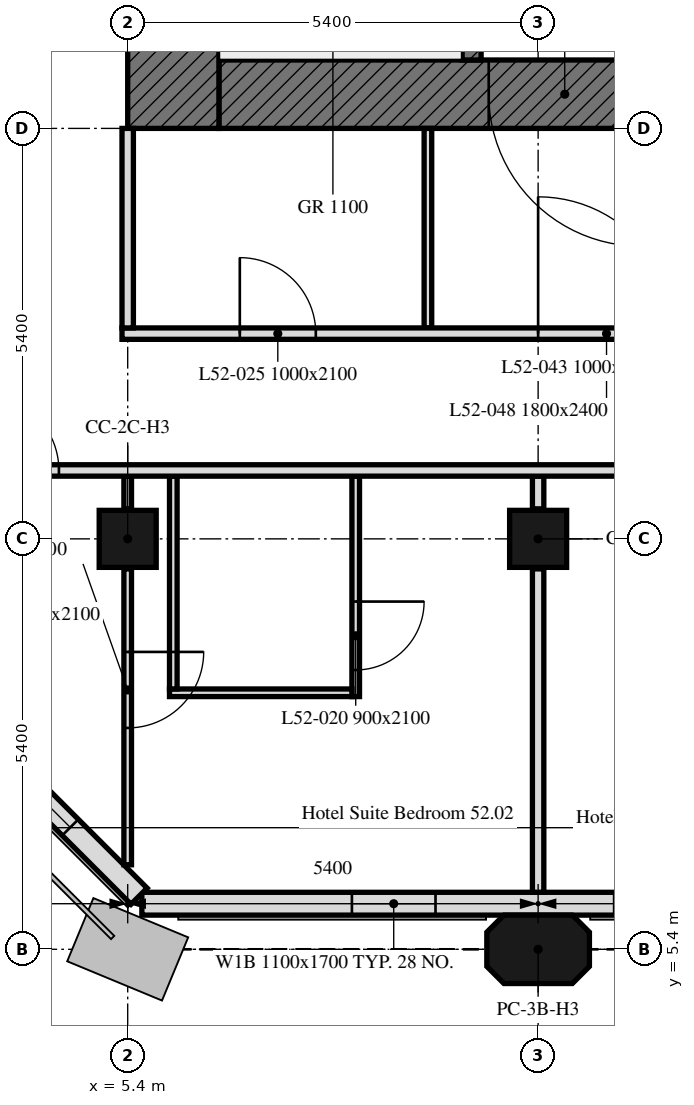
"""IFC4 building model, lengths in metres.
Left out: names, types, materials, properties, quantities, classifications, styles, units other than length and angle.
Written with IfcOpenShell. Run it as: python <this file> out.ifc"""

import sys

from ifc_helpers import new_model, si_unit, direction, frame, frame_2d, origin, origin_2d, place, context, subcontext, project, spatial, polyline, rectangle, outline, extrude, element, fill, save


model = new_model("IFC4")
c1 = context("Model", 3, precision=1e-05, world=origin(), true_north=direction((0.0, 1.0)))
c2 = subcontext(c1, "Body", "Model", "MODEL_VIEW")
j1 = project(units=[si_unit("LENGTHUNIT", "METRE"), si_unit("PLANEANGLEUNIT", "RADIAN")], contexts=[c1])
p1 = place(None, origin())
s1 = spatial("IfcSite", under=j1, at=p1, CompositionType="ELEMENT")
p2 = place(p1, origin())
s2 = spatial("IfcBuilding", under=s1, at=p2, CompositionType="ELEMENT")
p3 = place(p2, frame((0.0, 0.0, 210.4)))
s3 = spatial("IfcBuildingStorey", under=s2, at=p3, CompositionType="ELEMENT", Elevation=210.4)
p4 = place(p3, frame((10.8, 5.4, 0.0), z_axis=(0.0, 0.0, 1.0), x_axis=(1.0, 0.0, 0.0)))
e1 = element("IfcColumn", 1, at=p4, inside=s3, PredefinedType="COLUMN", context=c2, shape_type="SweptSolid", body=[
    extrude(outline(polyline([(-0.45, -0.45), (0.45, -0.45), (0.675, -0.225), (0.675, 0.225), (0.45, 0.45), (-0.45, 0.45), (-0.675, 0.225), (-0.675, -0.225), (-0.45, -0.45)])), origin(), (0.0, 0.0, 1.0), 3.0),
])
for number, where, z_axis, x_axis in (
    (2, (5.4, 10.8, 0.0), (0.0, 0.0, 1.0), (1.0, 0.0, 0.0)),
    (3, (10.8, 10.8, 0.0), (0.0, 0.0, 1.0), (1.0, 0.0, 0.0)),
):
    element("IfcColumn", number, at=place(p3, frame(where, z_axis=z_axis, x_axis=x_axis)), inside=s3, PredefinedType="COLUMN", context=c2, shape_type="SweptSolid", body=[
        extrude(rectangle(XDim=0.75, YDim=0.75, at=origin_2d()), origin(), (0.0, 0.0, 1.0), 3.0),
    ])
p5 = place(p3, frame((5.586, 6.0, 0.0), z_axis=(0.0, 0.0, 1.0), x_axis=(1.0, 0.0, 0.0)))
e4 = element("IfcWall", 4, at=p5, inside=s3, PredefinedType="SOLIDWALL", context=c2, shape_type="SweptSolid", body=[
    extrude(rectangle(XDim=32.027, YDim=0.3, at=frame_2d((16.014, 0.0))), origin(), (0.0, 0.0, 1.0), 3.0),
])
p6 = place(p5, frame((2.764, 0.0, 0.9)))
e5 = element("IfcOpeningElement", 5, at=p6, cuts=e4, PredefinedType="OPENING", context=c2, shape_type="SweptSolid", body=[
    extrude(rectangle(XDim=1.1, YDim=1.7, at=frame_2d((0.55, 0.85))), frame((0.0, 0.16, 0.0), z_axis=(0.0, -1.0, 0.0), x_axis=(1.0, 0.0, 0.0)), (0.0, 0.0, 1.0), 0.32),
])
p7 = place(p5, frame((6.214, 0.0, 0.9)))
e6 = element("IfcOpeningElement", 6, at=p7, cuts=e4, PredefinedType="OPENING", context=c2, shape_type="SweptSolid", body=[
    extrude(rectangle(XDim=3.4, YDim=1.7, at=frame_2d((1.7, 0.85))), frame((0.0, 0.16, 0.0), z_axis=(0.0, -1.0, 0.0), x_axis=(1.0, 0.0, 0.0)), (0.0, 0.0, 1.0), 0.32),
])
p8 = place(p5, frame((13.564, 0.0, 0.9)))
e7 = element("IfcOpeningElement", 7, at=p8, cuts=e4, PredefinedType="OPENING", context=c2, shape_type="SweptSolid", body=[
    extrude(rectangle(XDim=1.1, YDim=1.7, at=frame_2d((0.55, 0.85))), frame((0.0, 0.16, 0.0), z_axis=(0.0, -1.0, 0.0), x_axis=(1.0, 0.0, 0.0)), (0.0, 0.0, 1.0), 0.32),
])
p9 = place(p5, frame((17.014, 0.0, 0.9)))
e8 = element("IfcOpeningElement", 8, at=p9, cuts=e4, PredefinedType="OPENING", context=c2, shape_type="SweptSolid", body=[
    extrude(rectangle(XDim=3.4, YDim=1.7, at=frame_2d((1.7, 0.85))), frame((0.0, 0.16, 0.0), z_axis=(0.0, -1.0, 0.0), x_axis=(1.0, 0.0, 0.0)), (0.0, 0.0, 1.0), 0.32),
])
p10 = place(p5, frame((24.364, 0.0, 0.9)))
e9 = element("IfcOpeningElement", 9, at=p10, cuts=e4, PredefinedType="OPENING", context=c2, shape_type="SweptSolid", body=[
    extrude(rectangle(XDim=1.1, YDim=1.7, at=frame_2d((0.55, 0.85))), frame((0.0, 0.16, 0.0), z_axis=(0.0, -1.0, 0.0), x_axis=(1.0, 0.0, 0.0)), (0.0, 0.0, 1.0), 0.32),
])
p11 = place(p5, frame((27.814, 0.0, 0.9)))
e10 = element("IfcOpeningElement", 10, at=p11, cuts=e4, PredefinedType="OPENING", context=c2, shape_type="SweptSolid", body=[
    extrude(rectangle(XDim=3.4, YDim=1.7, at=frame_2d((1.7, 0.85))), frame((0.0, 0.16, 0.0), z_axis=(0.0, -1.0, 0.0), x_axis=(1.0, 0.0, 0.0)), (0.0, 0.0, 1.0), 0.32),
])
p12 = place(p3, frame((0.699, 10.949, 0.0), z_axis=(0.0, 0.0, 1.0), x_axis=(0.707106781187, -0.707106781187, 0.0)))
e11 = element("IfcWall", 11, at=p12, inside=s3, PredefinedType="SOLIDWALL", context=c2, shape_type="SweptSolid", body=[
    extrude(rectangle(XDim=6.86, YDim=0.3, at=frame_2d((3.43, 0.0))), origin(), (0.0, 0.0, 1.0), 3.0),
])
p13 = place(p12, frame((1.28, 0.0, 0.9)))
e12 = element("IfcOpeningElement", 12, at=p13, cuts=e11, PredefinedType="OPENING", context=c2, shape_type="SweptSolid", body=[
    extrude(rectangle(XDim=1.1, YDim=1.7, at=frame_2d((0.55, 0.85))), frame((0.0, 0.16, 0.0), z_axis=(0.0, -1.0, 0.0), x_axis=(1.0, 0.0, 0.0)), (0.0, 0.0, 1.0), 0.32),
])
p14 = place(p12, frame((4.48, 0.0, 0.9)))
e13 = element("IfcOpeningElement", 13, at=p14, cuts=e11, PredefinedType="OPENING", context=c2, shape_type="SweptSolid", body=[
    extrude(rectangle(XDim=1.1, YDim=1.7, at=frame_2d((0.55, 0.85))), frame((0.0, 0.16, 0.0), z_axis=(0.0, -1.0, 0.0), x_axis=(1.0, 0.0, 0.0)), (0.0, 0.0, 1.0), 0.32),
])
p15 = place(p3, frame((17.7, 16.65, 0.0), z_axis=(0.0, 0.0, 1.0), x_axis=(-1.0, 0.0, 0.0)))
e14 = element("IfcWall", 14, at=p15, inside=s3, PredefinedType="SOLIDWALL", context=c2, shape_type="SweptSolid", body=[
    extrude(rectangle(XDim=11.1, YDim=0.9, at=frame_2d((5.55, 0.0))), origin(), (0.0, 0.0, 1.0), 3.0),
])
p16 = place(p15, frame((5.55, 0.0, 0.0)))
e15 = element("IfcOpeningElement", 15, at=p16, cuts=e14, PredefinedType="OPENING", context=c2, shape_type="SweptSolid", body=[
    extrude(rectangle(XDim=2.0, YDim=2.4, at=frame_2d((1.0, 1.2))), frame((0.0, 0.45, 0.0), z_axis=(0.0, -1.0, 0.0), x_axis=(1.0, 0.0, 0.0)), (0.0, 0.0, 1.0), 0.9),
])
p17 = place(p3, frame((6.0, 16.2, 0.0), z_axis=(0.0, 0.0, 1.0), x_axis=(0.0, 1.0, 0.0)))
e16 = element("IfcWall", 16, at=p17, inside=s3, PredefinedType="SOLIDWALL", context=c2, shape_type="SweptSolid", body=[
    extrude(rectangle(XDim=16.2, YDim=1.2, at=frame_2d((8.1, 0.0))), origin(), (0.0, 0.0, 1.0), 3.0),
])
p18 = place(p3, frame((9.925, 17.1, 0.0), z_axis=(0.0, 0.0, 1.0), x_axis=(0.0, 1.0, 0.0)))
e17 = element("IfcWall", 17, at=p18, inside=s3, PredefinedType="SOLIDWALL", context=c2, shape_type="SweptSolid", body=[
    extrude(rectangle(XDim=14.4, YDim=0.25, at=frame_2d((7.2, 0.0))), origin(), (0.0, 0.0, 1.0), 3.0),
])
p19 = place(p18, frame((4.6, 0.0, 0.0)))
e18 = element("IfcOpeningElement", 18, at=p19, cuts=e17, PredefinedType="OPENING", context=c2, shape_type="SweptSolid", body=[
    extrude(rectangle(XDim=1.0, YDim=2.1, at=frame_2d((0.5, 1.05))), frame((0.0, 0.125, 0.0), z_axis=(0.0, -1.0, 0.0), x_axis=(1.0, 0.0, 0.0)), (0.0, 0.0, 1.0), 0.25),
])
p20 = place(p18, frame((7.062, 0.0, 0.0)))
e19 = element("IfcOpeningElement", 19, at=p20, cuts=e17, PredefinedType="OPENING", context=c2, shape_type="SweptSolid", body=[
    extrude(rectangle(XDim=1.2, YDim=2.1, at=frame_2d((0.6, 1.05))), frame((0.0, 0.125, 0.0), z_axis=(0.0, -1.0, 0.0), x_axis=(1.0, 0.0, 0.0)), (0.0, 0.0, 1.0), 0.25),
])
p21 = place(p18, frame((9.979, 0.0, 0.0)))
e20 = element("IfcOpeningElement", 20, at=p21, cuts=e17, PredefinedType="OPENING", context=c2, shape_type="SweptSolid", body=[
    extrude(rectangle(XDim=0.9, YDim=2.1, at=frame_2d((0.45, 1.05))), frame((0.0, 0.125, 0.0), z_axis=(0.0, -1.0, 0.0), x_axis=(1.0, 0.0, 0.0)), (0.0, 0.0, 1.0), 0.25),
])
p22 = place(p18, frame((11.92, 0.0, 0.0)))
e21 = element("IfcOpeningElement", 21, at=p22, cuts=e17, PredefinedType="OPENING", context=c2, shape_type="SweptSolid", body=[
    extrude(rectangle(XDim=0.9, YDim=2.1, at=frame_2d((0.45, 1.05))), frame((0.0, 0.125, 0.0), z_axis=(0.0, -1.0, 0.0), x_axis=(1.0, 0.0, 0.0)), (0.0, 0.0, 1.0), 0.25),
])
p23 = place(p18, frame((13.354, 0.0, 0.0)))
e22 = element("IfcOpeningElement", 22, at=p23, cuts=e17, PredefinedType="OPENING", context=c2, shape_type="SweptSolid", body=[
    extrude(rectangle(XDim=0.9, YDim=2.1, at=frame_2d((0.45, 1.05))), frame((0.0, 0.125, 0.0), z_axis=(0.0, -1.0, 0.0), x_axis=(1.0, 0.0, 0.0)), (0.0, 0.0, 1.0), 0.25),
])
p24 = place(p3, frame((10.8, 11.625, 0.0), z_axis=(0.0, 0.0, 1.0), x_axis=(0.0, -1.0, 0.0)))
e23 = element("IfcWall", 23, at=p24, inside=s3, PredefinedType="PARTITIONING", context=c2, shape_type="SweptSolid", body=[
    extrude(rectangle(XDim=0.43, YDim=0.15, at=frame_2d((0.215, 0.0))), origin(), (0.0, 0.0, 1.0), 3.0),
])
p25 = place(p3, frame((10.8, 10.405, 0.0), z_axis=(0.0, 0.0, 1.0), x_axis=(0.0, -1.0, 0.0)))
e24 = element("IfcWall", 24, at=p25, inside=s3, PredefinedType="PARTITIONING", context=c2, shape_type="SweptSolid", body=[
    extrude(rectangle(XDim=4.254, YDim=0.15, at=frame_2d((2.127, 0.0))), origin(), (0.0, 0.0, 1.0), 3.0),
])
p26 = place(p3, frame((8.4, 11.625, 0.0), z_axis=(0.0, 0.0, 1.0), x_axis=(0.0, -1.0, 0.0)))
e25 = element("IfcWall", 25, at=p26, inside=s3, PredefinedType="PARTITIONING", context=c2, shape_type="SweptSolid", body=[
    extrude(rectangle(XDim=2.9, YDim=0.1, at=frame_2d((1.45, 0.0))), origin(), (0.0, 0.0, 1.0), 3.0),
])
p27 = place(p26, frame((1.65, 0.0, 0.0)))
e26 = element("IfcOpeningElement", 26, at=p27, cuts=e25, PredefinedType="OPENING", context=c2, shape_type="SweptSolid", body=[
    extrude(rectangle(XDim=0.9, YDim=2.1, at=frame_2d((0.45, 1.05))), frame((0.0, 0.05, 0.0), z_axis=(0.0, -1.0, 0.0), x_axis=(1.0, 0.0, 0.0)), (0.0, 0.0, 1.0), 0.1),
])
p28 = place(p3, frame((8.35, 8.775, 0.0), z_axis=(0.0, 0.0, 1.0), x_axis=(-1.0, 0.0, 0.0)))
e27 = element("IfcWall", 27, at=p28, inside=s3, PredefinedType="PARTITIONING", context=c2, shape_type="SweptSolid", body=[
    extrude(rectangle(XDim=2.4, YDim=0.1, at=frame_2d((1.2, 0.0))), origin(), (0.0, 0.0, 1.0), 3.0),
])
p29 = place(p3, frame((6.0, 8.825, 0.0), z_axis=(0.0, 0.0, 1.0), x_axis=(0.0, 1.0, 0.0)))
e28 = element("IfcWall", 28, at=p29, inside=s3, PredefinedType="PARTITIONING", context=c2, shape_type="SweptSolid", body=[
    extrude(rectangle(XDim=2.8, YDim=0.1, at=frame_2d((1.4, 0.0))), origin(), (0.0, 0.0, 1.0), 3.0),
])
p30 = place(p3, frame((5.4, 11.625, 0.0), z_axis=(0.0, 0.0, 1.0), x_axis=(0.0, -1.0, 0.0)))
e29 = element("IfcWall", 29, at=p30, inside=s3, PredefinedType="PARTITIONING", context=c2, shape_type="SweptSolid", body=[
    extrude(rectangle(XDim=0.43, YDim=0.1, at=frame_2d((0.215, 0.0))), origin(), (0.0, 0.0, 1.0), 3.0),
])
p31 = place(p3, frame((5.4, 10.405, 0.0), z_axis=(0.0, 0.0, 1.0), x_axis=(0.0, -1.0, 0.0)))
e30 = element("IfcWall", 30, at=p31, inside=s3, PredefinedType="PARTITIONING", context=c2, shape_type="SweptSolid", body=[
    extrude(rectangle(XDim=3.893, YDim=0.1, at=frame_2d((1.946, 0.0))), origin(), (0.0, 0.0, 1.0), 3.0),
])
p32 = place(p31, frame((1.093, 0.0, 0.0)))
e31 = element("IfcOpeningElement", 31, at=p32, cuts=e30, PredefinedType="OPENING", context=c2, shape_type="SweptSolid", body=[
    extrude(rectangle(XDim=1.0, YDim=2.1, at=frame_2d((0.5, 1.05))), frame((0.0, 0.05, 0.0), z_axis=(0.0, -1.0, 0.0), x_axis=(1.0, 0.0, 0.0)), (0.0, 0.0, 1.0), 0.1),
])
p33 = place(p3, frame((0.751, 11.7, 0.0), z_axis=(0.0, 0.0, 1.0), x_axis=(1.0, 0.0, 0.0)))
e32 = element("IfcWall", 32, at=p33, inside=s3, PredefinedType="PARTITIONING", context=c2, shape_type="SweptSolid", body=[
    extrude(rectangle(XDim=41.698, YDim=0.15, at=frame_2d((20.849, 0.0))), origin(), (0.0, 0.0, 1.0), 3.0),
])
p34 = place(p33, frame((39.249, 0.0, 0.0)))
e33 = element("IfcOpeningElement", 33, at=p34, cuts=e32, PredefinedType="OPENING", context=c2, shape_type="SweptSolid", body=[
    extrude(rectangle(XDim=1.0, YDim=2.1, at=frame_2d((0.5, 1.05))), frame((0.0, 0.075, 0.0), z_axis=(0.0, -1.0, 0.0), x_axis=(1.0, 0.0, 0.0)), (0.0, 0.0, 1.0), 0.15),
])
p35 = place(p33, frame((27.649, 0.0, 0.0)))
e34 = element("IfcOpeningElement", 34, at=p35, cuts=e32, PredefinedType="OPENING", context=c2, shape_type="SweptSolid", body=[
    extrude(rectangle(XDim=1.0, YDim=2.1, at=frame_2d((0.5, 1.05))), frame((0.0, 0.075, 0.0), z_axis=(0.0, -1.0, 0.0), x_axis=(1.0, 0.0, 0.0)), (0.0, 0.0, 1.0), 0.15),
])
p36 = place(p33, frame((22.249, 0.0, 0.0)))
e35 = element("IfcOpeningElement", 35, at=p36, cuts=e32, PredefinedType="OPENING", context=c2, shape_type="SweptSolid", body=[
    extrude(rectangle(XDim=1.0, YDim=2.1, at=frame_2d((0.5, 1.05))), frame((0.0, 0.075, 0.0), z_axis=(0.0, -1.0, 0.0), x_axis=(1.0, 0.0, 0.0)), (0.0, 0.0, 1.0), 0.15),
])
p37 = place(p33, frame((16.849, 0.0, 0.0)))
e36 = element("IfcOpeningElement", 36, at=p37, cuts=e32, PredefinedType="OPENING", context=c2, shape_type="SweptSolid", body=[
    extrude(rectangle(XDim=1.0, YDim=2.1, at=frame_2d((0.5, 1.05))), frame((0.0, 0.075, 0.0), z_axis=(0.0, -1.0, 0.0), x_axis=(1.0, 0.0, 0.0)), (0.0, 0.0, 1.0), 0.15),
])
p38 = place(p33, frame((11.449, 0.0, 0.0)))
e37 = element("IfcOpeningElement", 37, at=p38, cuts=e32, PredefinedType="OPENING", context=c2, shape_type="SweptSolid", body=[
    extrude(rectangle(XDim=1.0, YDim=2.1, at=frame_2d((0.5, 1.05))), frame((0.0, 0.075, 0.0), z_axis=(0.0, -1.0, 0.0), x_axis=(1.0, 0.0, 0.0)), (0.0, 0.0, 1.0), 0.15),
])
p39 = place(p33, frame((2.744, 0.0, 0.0)))
e38 = element("IfcOpeningElement", 38, at=p39, cuts=e32, PredefinedType="OPENING", context=c2, shape_type="SweptSolid", body=[
    extrude(rectangle(XDim=1.0, YDim=2.1, at=frame_2d((0.5, 1.05))), frame((0.0, 0.075, 0.0), z_axis=(0.0, -1.0, 0.0), x_axis=(1.0, 0.0, 0.0)), (0.0, 0.0, 1.0), 0.15),
])
p40 = place(p3, frame((9.35, 16.2, 0.0), z_axis=(0.0, 0.0, 1.0), x_axis=(0.0, -1.0, 0.0)))
e39 = element("IfcWall", 39, at=p40, inside=s3, PredefinedType="PARTITIONING", context=c2, shape_type="SweptSolid", body=[
    extrude(rectangle(XDim=2.625, YDim=0.1, at=frame_2d((1.312, 0.0))), origin(), (0.0, 0.0, 1.0), 3.0),
])
p41 = place(p3, frame((5.325, 13.5, 0.0), z_axis=(0.0, 0.0, 1.0), x_axis=(1.0, 0.0, 0.0)))
e40 = element("IfcWall", 40, at=p41, inside=s3, PredefinedType="PARTITIONING", context=c2, shape_type="SweptSolid", body=[
    extrude(rectangle(XDim=7.525, YDim=0.15, at=frame_2d((3.763, 0.0))), origin(), (0.0, 0.0, 1.0), 3.0),
])
p42 = place(p41, frame((1.55, 0.0, 0.0)))
e41 = element("IfcOpeningElement", 41, at=p42, cuts=e40, PredefinedType="OPENING", context=c2, shape_type="SweptSolid", body=[
    extrude(rectangle(XDim=1.0, YDim=2.1, at=frame_2d((0.5, 1.05))), frame((0.0, 0.075, 0.0), z_axis=(0.0, -1.0, 0.0), x_axis=(1.0, 0.0, 0.0)), (0.0, 0.0, 1.0), 0.15),
])
p43 = place(p41, frame((5.475, 0.0, 0.0)))
e42 = element("IfcOpeningElement", 42, at=p43, cuts=e40, PredefinedType="OPENING", context=c2, shape_type="SweptSolid", body=[
    extrude(rectangle(XDim=1.8, YDim=2.4, at=frame_2d((0.9, 1.2))), frame((0.0, 0.075, 0.0), z_axis=(0.0, -1.0, 0.0), x_axis=(1.0, 0.0, 0.0)), (0.0, 0.0, 1.0), 0.15),
])
p44 = place(p3, frame((5.4, 13.575, 0.0), z_axis=(0.0, 0.0, 1.0), x_axis=(0.0, 1.0, 0.0)))
e43 = element("IfcWall", 43, at=p44, inside=s3, PredefinedType="PARTITIONING", context=c2, shape_type="SweptSolid", body=[
    extrude(rectangle(XDim=2.625, YDim=0.15, at=frame_2d((1.312, 0.0))), origin(), (0.0, 0.0, 1.0), 3.0),
])
p45 = place(p6, origin())
e44 = element("IfcWindow", 44, at=p45, inside=s3, PartitioningType="SINGLE_PANEL", PredefinedType="WINDOW", context=c2, shape_type="SweptSolid", body=[
    extrude(rectangle(XDim=1.1, YDim=1.7, at=frame_2d((0.55, 0.85))), frame((0.0, 0.03, 0.0), z_axis=(0.0, -1.0, 0.0), x_axis=(1.0, 0.0, 0.0)), (0.0, 0.0, 1.0), 0.06),
])
fill(e5, e44)
p46 = place(p14, origin())
e45 = element("IfcWindow", 45, at=p46, inside=s3, PartitioningType="SINGLE_PANEL", PredefinedType="WINDOW", context=c2, shape_type="SweptSolid", body=[
    extrude(rectangle(XDim=1.1, YDim=1.7, at=frame_2d((0.55, 0.85))), frame((0.0, 0.03, 0.0), z_axis=(0.0, -1.0, 0.0), x_axis=(1.0, 0.0, 0.0)), (0.0, 0.0, 1.0), 0.06),
])
fill(e13, e45)
p47 = place(p16, origin())
e46 = element("IfcDoor", 46, at=p47, inside=s3, OperationType="DOUBLE_DOOR_SINGLE_SWING", PredefinedType="DOOR", context=c2, shape_type="SweptSolid", body=[
    extrude(rectangle(XDim=2.0, YDim=2.4, at=frame_2d((1.0, 1.2))), frame((0.0, 0.025, 0.0), z_axis=(0.0, -1.0, 0.0), x_axis=(1.0, 0.0, 0.0)), (0.0, 0.0, 1.0), 0.05),
])
fill(e15, e46)
p48 = place(p27, origin())
e47 = element("IfcDoor", 47, at=p48, inside=s3, OperationType="SINGLE_SWING_LEFT", PredefinedType="DOOR", context=c2, shape_type="SweptSolid", body=[
    extrude(rectangle(XDim=0.9, YDim=2.1, at=frame_2d((0.45, 1.05))), frame((0.0, 0.025, 0.0), z_axis=(0.0, -1.0, 0.0), x_axis=(1.0, 0.0, 0.0)), (0.0, 0.0, 1.0), 0.05),
])
fill(e26, e47)
p49 = place(p42, origin())
e48 = element("IfcDoor", 48, at=p49, inside=s3, OperationType="SINGLE_SWING_RIGHT", PredefinedType="DOOR", context=c2, shape_type="SweptSolid", body=[
    extrude(rectangle(XDim=1.0, YDim=2.1, at=frame_2d((0.5, 1.05))), frame((0.0, 0.025, 0.0), z_axis=(0.0, -1.0, 0.0), x_axis=(1.0, 0.0, 0.0)), (0.0, 0.0, 1.0), 0.05),
])
fill(e41, e48)
p50 = place(p32, origin())
e49 = element("IfcDoor", 49, at=p50, inside=s3, OperationType="SINGLE_SWING_LEFT", PredefinedType="DOOR", context=c2, shape_type="SweptSolid", body=[
    extrude(rectangle(XDim=1.0, YDim=2.1, at=frame_2d((0.5, 1.05))), frame((0.0, 0.025, 0.0), z_axis=(0.0, -1.0, 0.0), x_axis=(1.0, 0.0, 0.0)), (0.0, 0.0, 1.0), 0.05),
])
fill(e31, e49)
p51 = place(p39, origin())
e50 = element("IfcDoor", 50, at=p51, inside=s3, OperationType="SINGLE_SWING_LEFT", PredefinedType="DOOR", context=c2, shape_type="SweptSolid", body=[
    extrude(rectangle(XDim=1.0, YDim=2.1, at=frame_2d((0.5, 1.05))), frame((0.0, 0.025, 0.0), z_axis=(0.0, -1.0, 0.0), x_axis=(1.0, 0.0, 0.0)), (0.0, 0.0, 1.0), 0.05),
])
fill(e38, e50)
p52 = place(p43, origin())
e51 = element("IfcDoor", 51, at=p52, inside=s3, OperationType="DOUBLE_DOOR_SINGLE_SWING", PredefinedType="DOOR", context=c2, shape_type="SweptSolid", body=[
    extrude(rectangle(XDim=1.8, YDim=2.4, at=frame_2d((0.9, 1.2))), frame((0.0, 0.025, 0.0), z_axis=(0.0, -1.0, 0.0), x_axis=(1.0, 0.0, 0.0)), (0.0, 0.0, 1.0), 0.05),
])
fill(e42, e51)
save(model, sys.argv[1])
